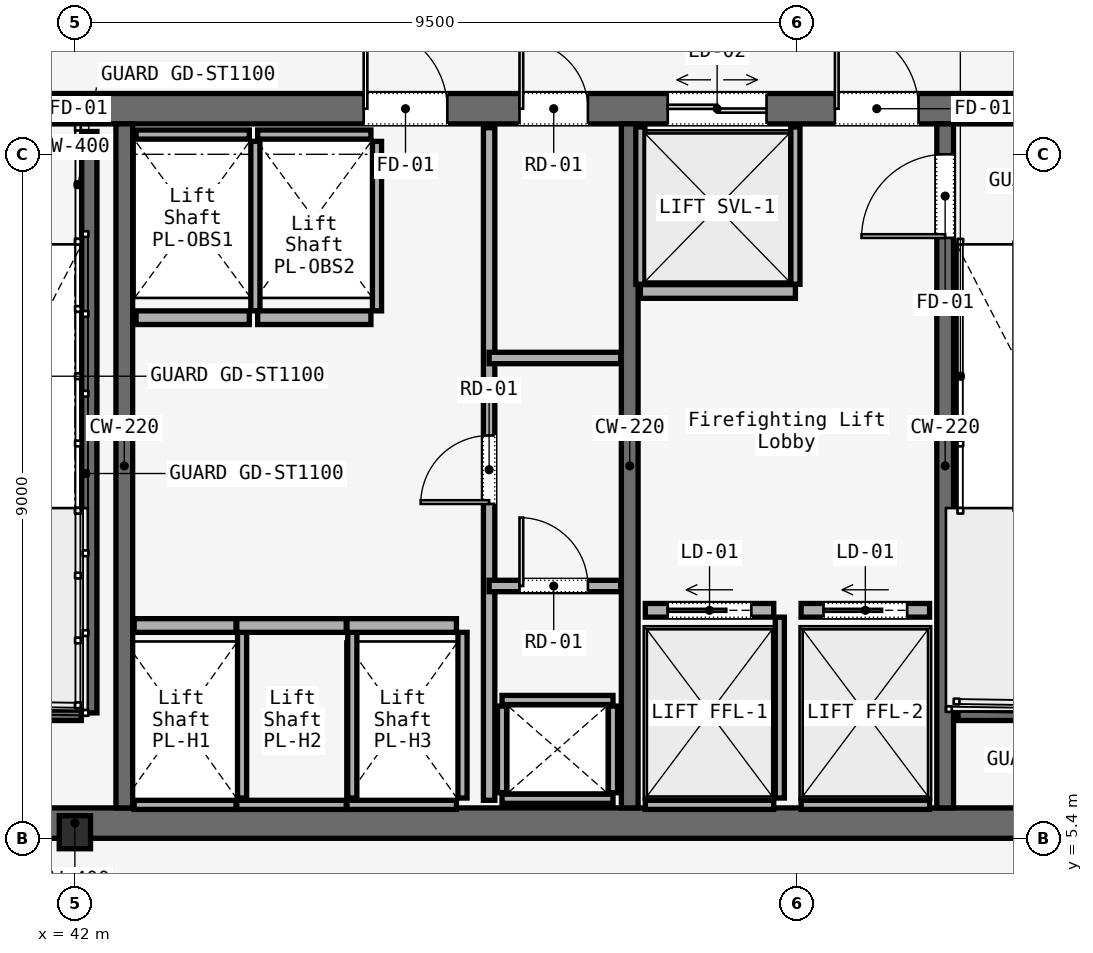
"""IFC4 building model, lengths in metres.
Left out: names, types, materials, properties, quantities, classifications, styles, units other than length and angle.
Written with IfcOpenShell. Run it as: python <this file> out.ifc"""

import sys

from ifc_helpers import new_model, si_unit, direction, frame, frame_2d, origin, origin_2d, place, context, subcontext, project, spatial, rectangle, i_section, extrude, element, fill, save


model = new_model("IFC4")
c1 = context("Model", 3, precision=1e-05, world=origin(), true_north=direction((0.0, 1.0)))
c2 = subcontext(c1, "Body", "Model", "MODEL_VIEW")
j1 = project(units=[si_unit("LENGTHUNIT", "METRE"), si_unit("PLANEANGLEUNIT", "RADIAN")], contexts=[c1])
p1 = place(None, origin())
s1 = spatial("IfcSite", under=j1, at=p1, CompositionType="ELEMENT")
p2 = place(p1, origin())
s2 = spatial("IfcBuilding", under=s1, at=p2, CompositionType="ELEMENT")
p3 = place(p2, frame((0.0, 0.0, 213.2)))
s3 = spatial("IfcBuildingStorey", under=s2, at=p3, CompositionType="ELEMENT", Elevation=213.2)
p4 = place(p3, frame((26.45, 15.0, 0.0), z_axis=(0.0, 0.0, 1.0), x_axis=(1.0, 0.0, 0.0)))
e1 = element("IfcWall", 1, at=p4, inside=s3, PredefinedType="SOLIDWALL", context=c2, shape_type="SweptSolid", body=[
    extrude(rectangle(XDim=31.1, YDim=0.4, at=frame_2d((15.55, 0.0))), origin(), (0.0, 0.0, 1.0), 4.58),
])
p5 = place(p4, frame((1.65, 0.0, 0.0)))
e2 = element("IfcOpeningElement", 2, at=p5, cuts=e1, PredefinedType="OPENING", context=c2, shape_type="SweptSolid", body=[
    extrude(rectangle(XDim=1.1, YDim=2.2, at=frame_2d((0.55, 1.1))), frame((0.0, 0.2, 0.0), z_axis=(0.0, -1.0, 0.0), x_axis=(1.0, 0.0, 0.0)), (0.0, 0.0, 1.0), 0.4),
])
p6 = place(p4, frame((13.65, 0.0, 0.0)))
e3 = element("IfcOpeningElement", 3, at=p6, cuts=e1, PredefinedType="OPENING", context=c2, shape_type="SweptSolid", body=[
    extrude(rectangle(XDim=1.1, YDim=2.2, at=frame_2d((0.55, 1.1))), frame((0.0, 0.2, 0.0), z_axis=(0.0, -1.0, 0.0), x_axis=(1.0, 0.0, 0.0)), (0.0, 0.0, 1.0), 0.4),
])
p7 = place(p4, frame((25.55, 0.0, 0.0)))
e4 = element("IfcOpeningElement", 4, at=p7, cuts=e1, PredefinedType="OPENING", context=c2, shape_type="SweptSolid", body=[
    extrude(rectangle(XDim=1.1, YDim=2.2, at=frame_2d((0.55, 1.1))), frame((0.0, 0.2, 0.0), z_axis=(0.0, -1.0, 0.0), x_axis=(1.0, 0.0, 0.0)), (0.0, 0.0, 1.0), 0.4),
])
p8 = place(p4, frame((10.7, 0.0, 0.0)))
e5 = element("IfcOpeningElement", 5, at=p8, cuts=e1, PredefinedType="OPENING", context=c2, shape_type="SweptSolid", body=[
    extrude(rectangle(XDim=1.4, YDim=2.2, at=frame_2d((0.7, 1.1))), frame((0.0, 0.2, 0.0), z_axis=(0.0, -1.0, 0.0), x_axis=(1.0, 0.0, 0.0)), (0.0, 0.0, 1.0), 0.4),
])
p9 = place(p4, frame((19.35, 0.0, 0.0)))
e6 = element("IfcOpeningElement", 6, at=p9, cuts=e1, PredefinedType="OPENING", context=c2, shape_type="SweptSolid", body=[
    extrude(rectangle(XDim=1.1, YDim=2.2, at=frame_2d((0.55, 1.1))), frame((0.0, 0.2, 0.0), z_axis=(0.0, -1.0, 0.0), x_axis=(1.0, 0.0, 0.0)), (0.0, 0.0, 1.0), 0.4),
])
p10 = place(p4, frame((21.4, 0.0, 0.0)))
e7 = element("IfcOpeningElement", 7, at=p10, cuts=e1, PredefinedType="OPENING", context=c2, shape_type="SweptSolid", body=[
    extrude(rectangle(XDim=0.9, YDim=2.1, at=frame_2d((0.45, 1.05))), frame((0.0, 0.2, 0.0), z_axis=(0.0, -1.0, 0.0), x_axis=(1.0, 0.0, 0.0)), (0.0, 0.0, 1.0), 0.4),
])
p11 = place(p4, frame((23.35, 0.0, 0.0)))
e8 = element("IfcOpeningElement", 8, at=p11, cuts=e1, PredefinedType="OPENING", context=c2, shape_type="SweptSolid", body=[
    extrude(rectangle(XDim=1.3, YDim=2.3, at=frame_2d((0.65, 1.15))), frame((0.0, 0.2, 0.0), z_axis=(0.0, -1.0, 0.0), x_axis=(1.0, 0.0, 0.0)), (0.0, 0.0, 1.0), 0.4),
])
p12 = place(p3, frame((26.45, 5.6, 0.0), z_axis=(0.0, 0.0, 1.0), x_axis=(1.0, 0.0, 0.0)))
e9 = element("IfcWall", 9, at=p12, inside=s3, PredefinedType="SOLIDWALL", context=c2, shape_type="SweptSolid", body=[
    extrude(rectangle(XDim=31.1, YDim=0.4, at=frame_2d((15.55, 0.0))), origin(), (0.0, 0.0, 1.0), 4.58),
])
for number, where, z_axis, x_axis in (
    (10, (42.65, 5.8, 0.0), (0.0, 0.0, 1.0), (0.0, 1.0, 0.0)),
    (11, (49.3, 5.8, 0.0), (0.0, 0.0, 1.0), (0.0, 1.0, 0.0)),
):
    element("IfcWall", number, at=place(p3, frame(where, z_axis=z_axis, x_axis=x_axis)), inside=s3, PredefinedType="SOLIDWALL", context=c2, shape_type="SweptSolid", body=[
        extrude(rectangle(XDim=9.0, YDim=0.22, at=frame_2d((4.5, 0.0))), origin(), (0.0, 0.0, 1.0), 4.58),
    ])
p13 = place(p3, frame((53.45, 5.8, 0.0), z_axis=(0.0, 0.0, 1.0), x_axis=(0.0, 1.0, 0.0)))
e12 = element("IfcWall", 12, at=p13, inside=s3, PredefinedType="SOLIDWALL", context=c2, shape_type="SweptSolid", body=[
    extrude(rectangle(XDim=9.0, YDim=0.22, at=frame_2d((4.5, 0.0))), origin(), (0.0, 0.0, 1.0), 4.58),
])
p14 = place(p13, frame((7.5, 0.0, 0.0)))
e13 = element("IfcOpeningElement", 13, at=p14, cuts=e12, PredefinedType="OPENING", context=c2, shape_type="SweptSolid", body=[
    extrude(rectangle(XDim=1.1, YDim=2.2, at=frame_2d((0.55, 1.1))), frame((0.0, 0.11, 0.0), z_axis=(0.0, -1.0, 0.0), x_axis=(1.0, 0.0, 0.0)), (0.0, 0.0, 1.0), 0.22),
])
p15 = place(p3, frame((42.0, 5.48, 0.0), z_axis=(0.0, 0.0, 1.0), x_axis=(1.0, 0.0, 0.0)))
e14 = element("IfcColumn", 14, at=p15, inside=s3, PredefinedType="COLUMN", context=c2, shape_type="SweptSolid", body=[
    extrude(i_section(OverallWidth=0.412, OverallDepth=0.435, WebThickness=0.036, FlangeThickness=0.044, FilletRadius=0.015, at=origin_2d()), origin(), (0.0, 0.0, 1.0), 4.58),
])
p16 = place(p3, frame((42.19, 14.7, 0.0), z_axis=(0.0, 0.0, 1.0), x_axis=(0.0, -1.0, 0.0)))
e15 = element("IfcWall", 15, at=p16, inside=s3, PredefinedType="SOLIDWALL", context=c2, shape_type="SweptSolid", body=[
    extrude(rectangle(XDim=7.65, YDim=0.2, at=frame_2d((3.825, 0.0))), origin(), (0.0, 0.0, 1.0), 4.8),
])
for number, where, z_axis, x_axis in (
    (16, (38.97, 7.05, 0.0), (0.0, 0.0, 1.0), (1.0, 0.0, 0.0)),
    (17, (53.62, 7.05, 0.0), (0.0, 0.0, 1.0), (1.0, 0.0, 0.0)),
):
    element("IfcWall", number, at=place(p3, frame(where, z_axis=z_axis, x_axis=x_axis)), inside=s3, PredefinedType="SOLIDWALL", context=c2, shape_type="SweptSolid", body=[
        extrude(rectangle(XDim=3.115, YDim=0.2, at=frame_2d((1.558, 0.0))), origin(), (0.0, 0.0, 1.0), 4.8),
    ])
for number, where, z_axis, x_axis in (
    (18, (47.62, 5.92, 0.0), (0.0, 0.0, 1.0), (1.0, 0.0, 0.0)),
    (19, (47.62, 7.22, 0.0), (0.0, 0.0, 1.0), (1.0, 0.0, 0.0)),
):
    element("IfcWall", number, at=place(p3, frame(where, z_axis=z_axis, x_axis=x_axis)), inside=s3, PredefinedType="SOLIDWALL", context=c2, shape_type="SweptSolid", body=[
        extrude(rectangle(XDim=1.46, YDim=0.12, at=frame_2d((0.73, 0.0))), origin(), (0.0, 0.0, 1.0), 4.01),
    ])
for number, where, z_axis, x_axis in (
    (20, (47.62, 6.0, 0.0), (0.0, 0.0, 1.0), (0.0, 1.0, 0.0)),
    (21, (49.08, 6.0, 0.0), (0.0, 0.0, 1.0), (0.0, 1.0, 0.0)),
):
    element("IfcWall", number, at=place(p3, frame(where, z_axis=z_axis, x_axis=x_axis)), inside=s3, PredefinedType="SOLIDWALL", context=c2, shape_type="SweptSolid", body=[
        extrude(rectangle(XDim=1.14, YDim=0.12, at=frame_2d((0.57, 0.0))), origin(), (0.0, 0.0, 1.0), 4.01),
    ])
p17 = place(p3, frame((47.45, 5.9, 0.0), z_axis=(0.0, 0.0, 1.0), x_axis=(0.0, 1.0, 0.0)))
e22 = element("IfcWall", 22, at=p17, inside=s3, PredefinedType="PARTITIONING", context=c2, shape_type="SweptSolid", body=[
    extrude(rectangle(XDim=8.85, YDim=0.15, at=frame_2d((4.425, 0.0))), origin(), (0.0, 0.0, 1.0), 4.01),
])
p18 = place(p17, frame((3.9, 0.0, 0.0)))
e23 = element("IfcOpeningElement", 23, at=p18, cuts=e22, PredefinedType="OPENING", context=c2, shape_type="SweptSolid", body=[
    extrude(rectangle(XDim=0.9, YDim=2.1, at=frame_2d((0.45, 1.05))), frame((0.0, 0.075, 0.0), z_axis=(0.0, -1.0, 0.0), x_axis=(1.0, 0.0, 0.0)), (0.0, 0.0, 1.0), 0.15),
])
p19 = place(p3, frame((47.45, 8.72, 0.0), z_axis=(0.0, 0.0, 1.0), x_axis=(1.0, 0.0, 0.0)))
e24 = element("IfcWall", 24, at=p19, inside=s3, PredefinedType="PARTITIONING", context=c2, shape_type="SweptSolid", body=[
    extrude(rectangle(XDim=1.73, YDim=0.15, at=frame_2d((0.865, 0.0))), origin(), (0.0, 0.0, 1.0), 4.01),
])
p20 = place(p19, frame((0.4, 0.0, 0.0)))
e25 = element("IfcOpeningElement", 25, at=p20, cuts=e24, PredefinedType="OPENING", context=c2, shape_type="SweptSolid", body=[
    extrude(rectangle(XDim=0.9, YDim=2.1, at=frame_2d((0.45, 1.05))), frame((0.0, 0.075, 0.0), z_axis=(0.0, -1.0, 0.0), x_axis=(1.0, 0.0, 0.0)), (0.0, 0.0, 1.0), 0.15),
])
p21 = place(p3, frame((47.45, 11.72, 0.0), z_axis=(0.0, 0.0, 1.0), x_axis=(1.0, 0.0, 0.0)))
e26 = element("IfcWall", 26, at=p21, inside=s3, PredefinedType="PARTITIONING", context=c2, shape_type="SweptSolid", body=[
    extrude(rectangle(XDim=1.73, YDim=0.15, at=frame_2d((0.865, 0.0))), origin(), (0.0, 0.0, 1.0), 4.01),
])
p22 = place(p3, frame((42.78, 8.2, 0.0), z_axis=(0.0, 0.0, 1.0), x_axis=(1.0, 0.0, 0.0)))
e27 = element("IfcWall", 27, at=p22, inside=s3, PredefinedType="SOLIDWALL", context=c2, shape_type="SweptSolid", body=[
    extrude(rectangle(XDim=1.34, YDim=0.18, at=frame_2d((0.67, 0.0))), origin(), (0.0, 0.0, 1.0), 4.01),
])
p23 = place(p3, frame((42.78, 5.84, 0.0), z_axis=(0.0, 0.0, 1.0), x_axis=(1.0, 0.0, 0.0)))
e28 = element("IfcWall", 28, at=p23, inside=s3, PredefinedType="SOLIDWALL", context=c2, shape_type="SweptSolid", body=[
    extrude(rectangle(XDim=1.34, YDim=0.12, at=frame_2d((0.67, 0.0))), origin(), (0.0, 0.0, 1.0), 4.01),
])
p24 = place(p3, frame((44.2, 5.93, 0.0), z_axis=(0.0, 0.0, 1.0), x_axis=(0.0, 1.0, 0.0)))
e29 = element("IfcWall", 29, at=p24, inside=s3, PredefinedType="SOLIDWALL", context=c2, shape_type="SweptSolid", body=[
    extrude(rectangle(XDim=2.18, YDim=0.12, at=frame_2d((1.09, 0.0))), origin(), (0.0, 0.0, 1.0), 4.01),
])
p25 = place(p3, frame((44.13, 8.2, 0.0), z_axis=(0.0, 0.0, 1.0), x_axis=(1.0, 0.0, 0.0)))
e30 = element("IfcWall", 30, at=p25, inside=s3, PredefinedType="SOLIDWALL", context=c2, shape_type="SweptSolid", body=[
    extrude(rectangle(XDim=1.44, YDim=0.18, at=frame_2d((0.72, 0.0))), origin(), (0.0, 0.0, 1.0), 4.01),
])
p26 = place(p3, frame((44.13, 5.84, 0.0), z_axis=(0.0, 0.0, 1.0), x_axis=(1.0, 0.0, 0.0)))
e31 = element("IfcWall", 31, at=p26, inside=s3, PredefinedType="SOLIDWALL", context=c2, shape_type="SweptSolid", body=[
    extrude(rectangle(XDim=1.44, YDim=0.12, at=frame_2d((0.72, 0.0))), origin(), (0.0, 0.0, 1.0), 4.01),
])
p27 = place(p3, frame((45.65, 5.93, 0.0), z_axis=(0.0, 0.0, 1.0), x_axis=(0.0, 1.0, 0.0)))
e32 = element("IfcWall", 32, at=p27, inside=s3, PredefinedType="SOLIDWALL", context=c2, shape_type="SweptSolid", body=[
    extrude(rectangle(XDim=2.18, YDim=0.12, at=frame_2d((1.09, 0.0))), origin(), (0.0, 0.0, 1.0), 4.01),
])
p28 = place(p3, frame((45.58, 8.2, 0.0), z_axis=(0.0, 0.0, 1.0), x_axis=(1.0, 0.0, 0.0)))
e33 = element("IfcWall", 33, at=p28, inside=s3, PredefinedType="SOLIDWALL", context=c2, shape_type="SweptSolid", body=[
    extrude(rectangle(XDim=1.44, YDim=0.18, at=frame_2d((0.72, 0.0))), origin(), (0.0, 0.0, 1.0), 4.01),
])
p29 = place(p3, frame((45.58, 5.84, 0.0), z_axis=(0.0, 0.0, 1.0), x_axis=(1.0, 0.0, 0.0)))
e34 = element("IfcWall", 34, at=p29, inside=s3, PredefinedType="SOLIDWALL", context=c2, shape_type="SweptSolid", body=[
    extrude(rectangle(XDim=1.44, YDim=0.12, at=frame_2d((0.72, 0.0))), origin(), (0.0, 0.0, 1.0), 4.01),
])
p30 = place(p3, frame((47.1, 5.93, 0.0), z_axis=(0.0, 0.0, 1.0), x_axis=(0.0, 1.0, 0.0)))
e35 = element("IfcWall", 35, at=p30, inside=s3, PredefinedType="SOLIDWALL", context=c2, shape_type="SweptSolid", body=[
    extrude(rectangle(XDim=2.18, YDim=0.12, at=frame_2d((1.09, 0.0))), origin(), (0.0, 0.0, 1.0), 4.01),
])
p31 = place(p3, frame((42.805, 12.25, 0.0), z_axis=(0.0, 0.0, 1.0), x_axis=(1.0, 0.0, 0.0)))
e36 = element("IfcWall", 36, at=p31, inside=s3, PredefinedType="SOLIDWALL", context=c2, shape_type="SweptSolid", body=[
    extrude(rectangle(XDim=1.49, YDim=0.18, at=frame_2d((0.745, 0.0))), origin(), (0.0, 0.0, 1.0), 4.01),
])
p32 = place(p3, frame((42.805, 14.66, 0.0), z_axis=(0.0, 0.0, 1.0), x_axis=(1.0, 0.0, 0.0)))
e37 = element("IfcWall", 37, at=p32, inside=s3, PredefinedType="SOLIDWALL", context=c2, shape_type="SweptSolid", body=[
    extrude(rectangle(XDim=1.49, YDim=0.12, at=frame_2d((0.745, 0.0))), origin(), (0.0, 0.0, 1.0), 4.01),
])
p33 = place(p3, frame((44.375, 12.34, 0.0), z_axis=(0.0, 0.0, 1.0), x_axis=(0.0, 1.0, 0.0)))
e38 = element("IfcWall", 38, at=p33, inside=s3, PredefinedType="SOLIDWALL", context=c2, shape_type="SweptSolid", body=[
    extrude(rectangle(XDim=2.23, YDim=0.12, at=frame_2d((1.115, 0.0))), origin(), (0.0, 0.0, 1.0), 4.01),
])
p34 = place(p3, frame((44.405, 12.25, 0.0), z_axis=(0.0, 0.0, 1.0), x_axis=(1.0, 0.0, 0.0)))
e39 = element("IfcWall", 39, at=p34, inside=s3, PredefinedType="SOLIDWALL", context=c2, shape_type="SweptSolid", body=[
    extrude(rectangle(XDim=1.49, YDim=0.18, at=frame_2d((0.745, 0.0))), origin(), (0.0, 0.0, 1.0), 4.01),
])
p35 = place(p3, frame((44.405, 14.66, 0.0), z_axis=(0.0, 0.0, 1.0), x_axis=(1.0, 0.0, 0.0)))
e40 = element("IfcWall", 40, at=p35, inside=s3, PredefinedType="SOLIDWALL", context=c2, shape_type="SweptSolid", body=[
    extrude(rectangle(XDim=1.49, YDim=0.12, at=frame_2d((0.745, 0.0))), origin(), (0.0, 0.0, 1.0), 4.01),
])
p36 = place(p3, frame((45.975, 12.34, 0.0), z_axis=(0.0, 0.0, 1.0), x_axis=(0.0, 1.0, 0.0)))
e41 = element("IfcWall", 41, at=p36, inside=s3, PredefinedType="SOLIDWALL", context=c2, shape_type="SweptSolid", body=[
    extrude(rectangle(XDim=2.23, YDim=0.12, at=frame_2d((1.115, 0.0))), origin(), (0.0, 0.0, 1.0), 4.01),
])
p37 = place(p3, frame((49.505, 8.4, 0.0), z_axis=(0.0, 0.0, 1.0), x_axis=(1.0, 0.0, 0.0)))
e42 = element("IfcWall", 42, at=p37, inside=s3, PredefinedType="SOLIDWALL", context=c2, shape_type="SweptSolid", body=[
    extrude(rectangle(XDim=1.69, YDim=0.18, at=frame_2d((0.845, 0.0))), origin(), (0.0, 0.0, 1.0), 4.01),
])
p38 = place(p37, frame((0.295, 0.0, 0.0)))
e43 = element("IfcOpeningElement", 43, at=p38, cuts=e42, PredefinedType="OPENING", context=c2, shape_type="SweptSolid", body=[
    extrude(rectangle(XDim=1.1, YDim=2.2, at=frame_2d((0.55, 1.1))), frame((0.0, 0.09, 0.0), z_axis=(0.0, -1.0, 0.0), x_axis=(1.0, 0.0, 0.0)), (0.0, 0.0, 1.0), 0.18),
])
p39 = place(p3, frame((49.505, 5.84, 0.0), z_axis=(0.0, 0.0, 1.0), x_axis=(1.0, 0.0, 0.0)))
e44 = element("IfcWall", 44, at=p39, inside=s3, PredefinedType="SOLIDWALL", context=c2, shape_type="SweptSolid", body=[
    extrude(rectangle(XDim=1.69, YDim=0.12, at=frame_2d((0.845, 0.0))), origin(), (0.0, 0.0, 1.0), 4.01),
])
p40 = place(p3, frame((51.275, 5.93, 0.0), z_axis=(0.0, 0.0, 1.0), x_axis=(0.0, 1.0, 0.0)))
e45 = element("IfcWall", 45, at=p40, inside=s3, PredefinedType="SOLIDWALL", context=c2, shape_type="SweptSolid", body=[
    extrude(rectangle(XDim=2.38, YDim=0.12, at=frame_2d((1.19, 0.0))), origin(), (0.0, 0.0, 1.0), 4.01),
])
p41 = place(p3, frame((51.555, 8.4, 0.0), z_axis=(0.0, 0.0, 1.0), x_axis=(1.0, 0.0, 0.0)))
e46 = element("IfcWall", 46, at=p41, inside=s3, PredefinedType="SOLIDWALL", context=c2, shape_type="SweptSolid", body=[
    extrude(rectangle(XDim=1.69, YDim=0.18, at=frame_2d((0.845, 0.0))), origin(), (0.0, 0.0, 1.0), 4.01),
])
p42 = place(p41, frame((0.295, 0.0, 0.0)))
e47 = element("IfcOpeningElement", 47, at=p42, cuts=e46, PredefinedType="OPENING", context=c2, shape_type="SweptSolid", body=[
    extrude(rectangle(XDim=1.1, YDim=2.2, at=frame_2d((0.55, 1.1))), frame((0.0, 0.09, 0.0), z_axis=(0.0, -1.0, 0.0), x_axis=(1.0, 0.0, 0.0)), (0.0, 0.0, 1.0), 0.18),
])
p43 = place(p3, frame((51.555, 5.84, 0.0), z_axis=(0.0, 0.0, 1.0), x_axis=(1.0, 0.0, 0.0)))
e48 = element("IfcWall", 48, at=p43, inside=s3, PredefinedType="SOLIDWALL", context=c2, shape_type="SweptSolid", body=[
    extrude(rectangle(XDim=1.69, YDim=0.12, at=frame_2d((0.845, 0.0))), origin(), (0.0, 0.0, 1.0), 4.01),
])
p44 = place(p3, frame((49.44, 12.595, 0.0), z_axis=(0.0, 0.0, 1.0), x_axis=(1.0, 0.0, 0.0)))
e49 = element("IfcWall", 49, at=p44, inside=s3, PredefinedType="SOLIDWALL", context=c2, shape_type="SweptSolid", body=[
    extrude(rectangle(XDim=2.04, YDim=0.18, at=frame_2d((1.02, 0.0))), origin(), (0.0, 0.0, 1.0), 4.01),
])
for number, where, z_axis, x_axis in (
    (50, (49.44, 12.69, 0.0), (0.0, 0.0, 1.0), (0.0, 1.0, 0.0)),
    (51, (51.48, 12.69, 0.0), (0.0, 0.0, 1.0), (0.0, 1.0, 0.0)),
):
    element("IfcWall", number, at=place(p3, frame(where, z_axis=z_axis, x_axis=x_axis)), inside=s3, PredefinedType="SOLIDWALL", context=c2, shape_type="SweptSolid", body=[
        extrude(rectangle(XDim=2.07, YDim=0.12, at=frame_2d((1.035, 0.0))), origin(), (0.0, 0.0, 1.0), 4.01),
    ])
p45 = place(p7, origin())
e52 = element("IfcDoor", 52, at=p45, inside=s3, OperationType="SINGLE_SWING_RIGHT", PredefinedType="DOOR", context=c2, shape_type="SweptSolid", body=[
    extrude(rectangle(XDim=1.1, YDim=2.2, at=frame_2d((0.55, 1.1))), frame((0.0, 0.025, 0.0), z_axis=(0.0, -1.0, 0.0), x_axis=(1.0, 0.0, 0.0)), (0.0, 0.0, 1.0), 0.05),
])
fill(e4, e52)
p46 = place(p9, origin())
e53 = element("IfcDoor", 53, at=p46, inside=s3, OperationType="SINGLE_SWING_LEFT", PredefinedType="DOOR", context=c2, shape_type="SweptSolid", body=[
    extrude(rectangle(XDim=1.1, YDim=2.2, at=frame_2d((0.55, 1.1))), frame((0.0, 0.025, 0.0), z_axis=(0.0, -1.0, 0.0), x_axis=(1.0, 0.0, 0.0)), (0.0, 0.0, 1.0), 0.05),
])
fill(e6, e53)
p47 = place(p10, origin())
e54 = element("IfcDoor", 54, at=p47, inside=s3, OperationType="SINGLE_SWING_LEFT", PredefinedType="DOOR", context=c2, shape_type="SweptSolid", body=[
    extrude(rectangle(XDim=0.9, YDim=2.1, at=frame_2d((0.45, 1.05))), frame((0.0, 0.025, 0.0), z_axis=(0.0, -1.0, 0.0), x_axis=(1.0, 0.0, 0.0)), (0.0, 0.0, 1.0), 0.05),
])
fill(e7, e54)
p48 = place(p14, origin())
e55 = element("IfcDoor", 55, at=p48, inside=s3, OperationType="SINGLE_SWING_LEFT", PredefinedType="DOOR", context=c2, shape_type="SweptSolid", body=[
    extrude(rectangle(XDim=1.1, YDim=2.2, at=frame_2d((0.55, 1.1))), frame((0.0, 0.025, 0.0), z_axis=(0.0, -1.0, 0.0), x_axis=(1.0, 0.0, 0.0)), (0.0, 0.0, 1.0), 0.05),
])
fill(e13, e55)
p49 = place(p18, origin())
e56 = element("IfcDoor", 56, at=p49, inside=s3, OperationType="SINGLE_SWING_LEFT", PredefinedType="DOOR", context=c2, shape_type="SweptSolid", body=[
    extrude(rectangle(XDim=0.9, YDim=2.1, at=frame_2d((0.45, 1.05))), frame((0.0, 0.025, 0.0), z_axis=(0.0, -1.0, 0.0), x_axis=(1.0, 0.0, 0.0)), (0.0, 0.0, 1.0), 0.05),
])
fill(e23, e56)
p50 = place(p20, origin())
e57 = element("IfcDoor", 57, at=p50, inside=s3, OperationType="SINGLE_SWING_RIGHT", PredefinedType="DOOR", context=c2, shape_type="SweptSolid", body=[
    extrude(rectangle(XDim=0.9, YDim=2.1, at=frame_2d((0.45, 1.05))), frame((0.0, 0.025, 0.0), z_axis=(0.0, -1.0, 0.0), x_axis=(1.0, 0.0, 0.0)), (0.0, 0.0, 1.0), 0.05),
])
fill(e25, e57)
p51 = place(p38, origin())
e58 = element("IfcDoor", 58, at=p51, inside=s3, OperationType="SLIDING_TO_LEFT", PredefinedType="DOOR", context=c2, shape_type="SweptSolid", body=[
    extrude(rectangle(XDim=1.1, YDim=2.2, at=frame_2d((0.55, 1.1))), frame((0.0, 0.025, 0.0), z_axis=(0.0, -1.0, 0.0), x_axis=(1.0, 0.0, 0.0)), (0.0, 0.0, 1.0), 0.05),
])
fill(e43, e58)
p52 = place(p42, origin())
e59 = element("IfcDoor", 59, at=p52, inside=s3, OperationType="SLIDING_TO_LEFT", PredefinedType="DOOR", context=c2, shape_type="SweptSolid", body=[
    extrude(rectangle(XDim=1.1, YDim=2.2, at=frame_2d((0.55, 1.1))), frame((0.0, 0.025, 0.0), z_axis=(0.0, -1.0, 0.0), x_axis=(1.0, 0.0, 0.0)), (0.0, 0.0, 1.0), 0.05),
])
fill(e47, e59)
p53 = place(p11, origin())
e60 = element("IfcDoor", 60, at=p53, inside=s3, OperationType="DOUBLE_DOOR_SLIDING", PredefinedType="DOOR", context=c2, shape_type="SweptSolid", body=[
    extrude(rectangle(XDim=1.3, YDim=2.3, at=frame_2d((0.65, 1.15))), frame((0.0, 0.025, 0.0), z_axis=(0.0, -1.0, 0.0), x_axis=(1.0, 0.0, 0.0)), (0.0, 0.0, 1.0), 0.05),
])
fill(e8, e60)
save(model, sys.argv[1])
